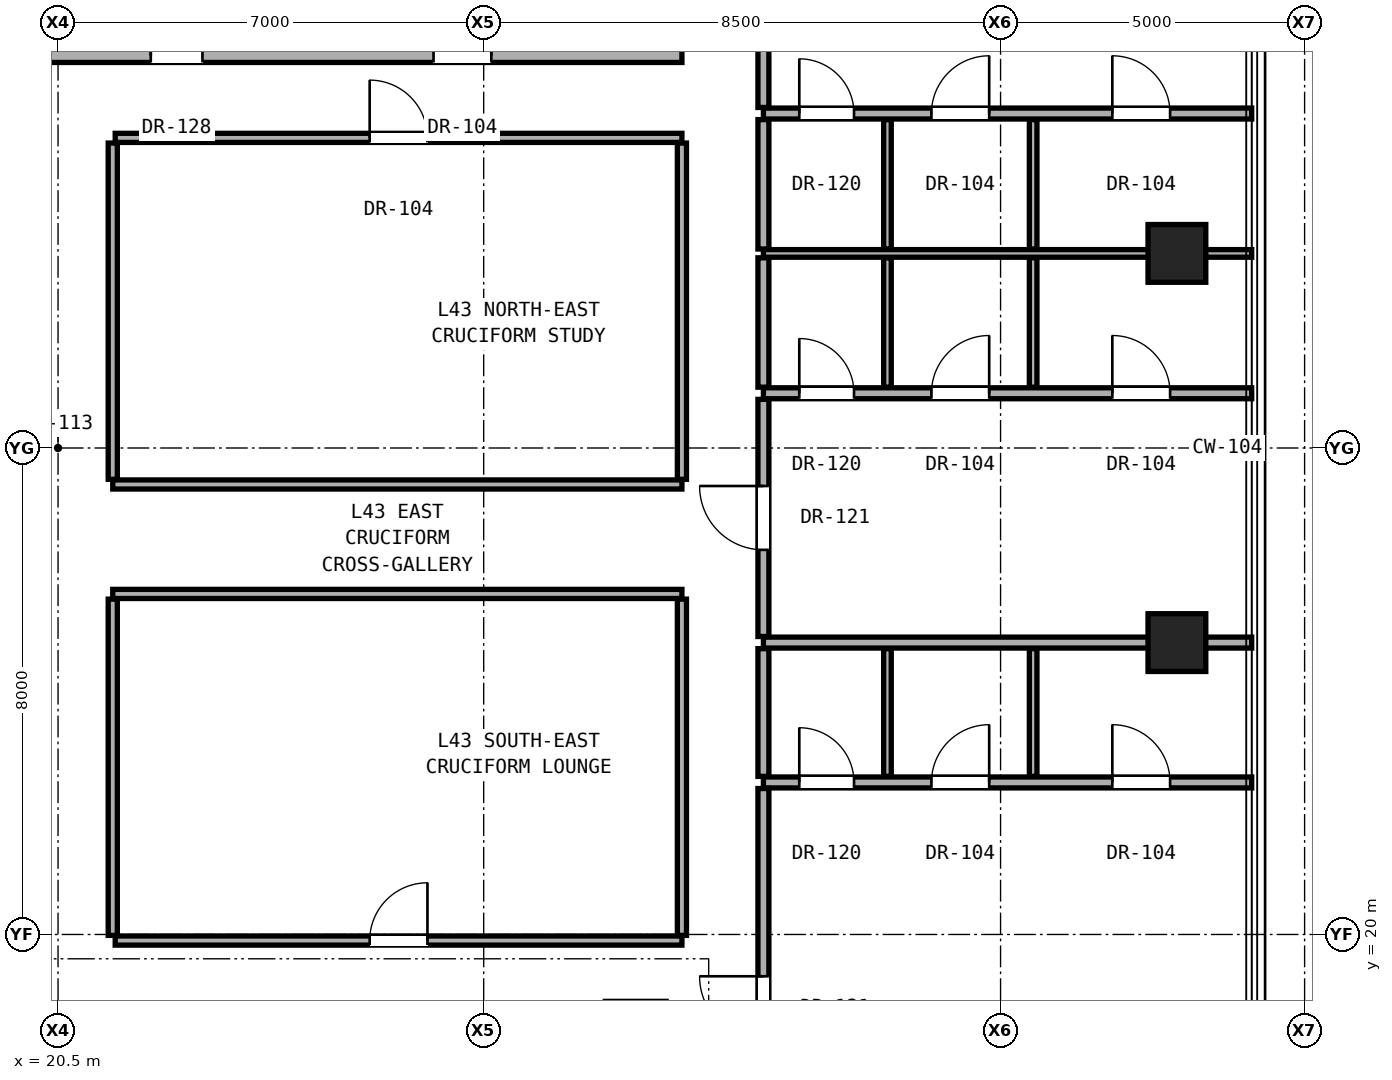
"""IFC4 building model, lengths in metres.
Left out: names, types, materials, properties, quantities, classifications, styles, units other than length and angle.
Written with IfcOpenShell. Run it as: python <this file> out.ifc"""

import sys

from ifc_helpers import new_model, si_unit, direction, frame, frame_2d, origin, origin_2d, place, context, subcontext, project, spatial, rectangle, hollow_rectangle, extrude, element, fill, save


model = new_model("IFC4")
c1 = context("Model", 3, precision=1e-05, world=origin(), true_north=direction((0.0, 1.0)))
c2 = subcontext(c1, "Body", "Model", "MODEL_VIEW")
j1 = project(units=[si_unit("LENGTHUNIT", "METRE"), si_unit("PLANEANGLEUNIT", "RADIAN")], contexts=[c1])
p1 = place(None, origin())
s1 = spatial("IfcSite", under=j1, at=p1, CompositionType="ELEMENT")
p2 = place(p1, origin())
s2 = spatial("IfcBuilding", under=s1, at=p2, CompositionType="ELEMENT")
p3 = place(p2, frame((0.0, 0.0, 154.4)))
s3 = spatial("IfcBuildingStorey", under=s2, at=p3, CompositionType="ELEMENT", Elevation=154.4)
for number, where, z_axis, x_axis in (
    (1, (38.9, 24.8, 0.0), (0.0, 0.0, 1.0), (1.0, 0.0, 0.0)),
    (2, (38.9, 31.2, 0.0), (0.0, 0.0, 1.0), (1.0, 0.0, 0.0)),
):
    element("IfcColumn", number, at=place(p3, frame(where, z_axis=z_axis, x_axis=x_axis)), inside=s3, PredefinedType="COLUMN", context=c2, shape_type="SweptSolid", body=[
        extrude(hollow_rectangle(XDim=0.95, YDim=0.95, WallThickness=0.05, at=origin_2d()), origin(), (0.0, 0.0, 1.0), 3.25),
    ])
p4 = place(p3, frame((21.44, 19.9, 0.0), z_axis=(0.0, 0.0, 1.0), x_axis=(1.0, 0.0, 0.0)))
e3 = element("IfcWall", 3, at=p4, inside=s3, PredefinedType="PARTITIONING", context=c2, shape_type="SweptSolid", body=[
    extrude(rectangle(XDim=9.32, YDim=0.15, at=frame_2d((4.66, 0.0))), origin(), (0.0, 0.0, 1.0), 2.186),
])
p5 = place(p4, frame((4.185, 0.0, 0.0)))
e4 = element("IfcOpeningElement", 4, at=p5, cuts=e3, PredefinedType="OPENING", context=c2, shape_type="SweptSolid", body=[
    extrude(rectangle(XDim=0.95, YDim=2.15, at=frame_2d((0.475, 1.075))), frame((0.0, 0.085, 0.0), z_axis=(0.0, -1.0, 0.0), x_axis=(1.0, 0.0, 0.0)), (0.0, 0.0, 1.0), 0.17),
])
p6 = place(p3, frame((32.1, 22.5, 0.0), z_axis=(0.0, 0.0, 1.0), x_axis=(1.0, 0.0, 0.0)))
e5 = element("IfcWall", 5, at=p6, inside=s3, PredefinedType="PARTITIONING", context=c2, shape_type="SweptSolid", body=[
    extrude(rectangle(XDim=8.03, YDim=0.18, at=frame_2d((4.015, 0.0))), origin(), (0.0, 0.0, 1.0), 2.269),
])
p7 = place(p6, frame((5.738, 0.0, 0.0)))
e6 = element("IfcOpeningElement", 6, at=p7, cuts=e5, PredefinedType="OPENING", context=c2, shape_type="SweptSolid", body=[
    extrude(rectangle(XDim=0.95, YDim=2.15, at=frame_2d((0.475, 1.075))), frame((0.0, 0.1, 0.0), z_axis=(0.0, -1.0, 0.0), x_axis=(1.0, 0.0, 0.0)), (0.0, 0.0, 1.0), 0.2),
])
p8 = place(p6, frame((2.763, 0.0, 0.0)))
e7 = element("IfcOpeningElement", 7, at=p8, cuts=e5, PredefinedType="OPENING", context=c2, shape_type="SweptSolid", body=[
    extrude(rectangle(XDim=0.95, YDim=2.15, at=frame_2d((0.475, 1.075))), frame((0.0, 0.1, 0.0), z_axis=(0.0, -1.0, 0.0), x_axis=(1.0, 0.0, 0.0)), (0.0, 0.0, 1.0), 0.2),
])
p9 = place(p6, frame((0.59, 0.0, 0.0)))
e8 = element("IfcOpeningElement", 8, at=p9, cuts=e5, PredefinedType="OPENING", context=c2, shape_type="SweptSolid", body=[
    extrude(rectangle(XDim=0.9, YDim=2.1, at=frame_2d((0.45, 1.05))), frame((0.0, 0.1, 0.0), z_axis=(0.0, -1.0, 0.0), x_axis=(1.0, 0.0, 0.0)), (0.0, 0.0, 1.0), 0.2),
])
p10 = place(p3, frame((32.1, 24.8, 0.0), z_axis=(0.0, 0.0, 1.0), x_axis=(1.0, 0.0, 0.0)))
e9 = element("IfcWall", 9, at=p10, inside=s3, PredefinedType="PARTITIONING", context=c2, shape_type="SweptSolid", body=[
    extrude(rectangle(XDim=8.03, YDim=0.18, at=frame_2d((4.015, 0.0))), origin(), (0.0, 0.0, 1.0), 2.269),
])
for number, where, z_axis, x_axis in (
    (10, (21.4, 25.6, 0.0), (0.0, 0.0, 1.0), (1.0, 0.0, 0.0)),
    (11, (21.4, 27.4, 0.0), (0.0, 0.0, 1.0), (1.0, 0.0, 0.0)),
):
    element("IfcWall", number, at=place(p3, frame(where, z_axis=z_axis, x_axis=x_axis)), inside=s3, PredefinedType="PARTITIONING", context=c2, shape_type="SweptSolid", body=[
        extrude(rectangle(XDim=9.36, YDim=0.15, at=frame_2d((4.68, 0.0))), origin(), (0.0, 0.0, 1.0), 2.186),
    ])
p11 = place(p3, frame((32.1, 28.9, 0.0), z_axis=(0.0, 0.0, 1.0), x_axis=(1.0, 0.0, 0.0)))
e12 = element("IfcWall", 12, at=p11, inside=s3, PredefinedType="PARTITIONING", context=c2, shape_type="SweptSolid", body=[
    extrude(rectangle(XDim=8.03, YDim=0.18, at=frame_2d((4.015, 0.0))), origin(), (0.0, 0.0, 1.0), 2.269),
])
p12 = place(p11, frame((5.738, 0.0, 0.0)))
e13 = element("IfcOpeningElement", 13, at=p12, cuts=e12, PredefinedType="OPENING", context=c2, shape_type="SweptSolid", body=[
    extrude(rectangle(XDim=0.95, YDim=2.15, at=frame_2d((0.475, 1.075))), frame((0.0, 0.1, 0.0), z_axis=(0.0, -1.0, 0.0), x_axis=(1.0, 0.0, 0.0)), (0.0, 0.0, 1.0), 0.2),
])
p13 = place(p11, frame((2.763, 0.0, 0.0)))
e14 = element("IfcOpeningElement", 14, at=p13, cuts=e12, PredefinedType="OPENING", context=c2, shape_type="SweptSolid", body=[
    extrude(rectangle(XDim=0.95, YDim=2.15, at=frame_2d((0.475, 1.075))), frame((0.0, 0.1, 0.0), z_axis=(0.0, -1.0, 0.0), x_axis=(1.0, 0.0, 0.0)), (0.0, 0.0, 1.0), 0.2),
])
p14 = place(p11, frame((0.59, 0.0, 0.0)))
e15 = element("IfcOpeningElement", 15, at=p14, cuts=e12, PredefinedType="OPENING", context=c2, shape_type="SweptSolid", body=[
    extrude(rectangle(XDim=0.9, YDim=2.1, at=frame_2d((0.45, 1.05))), frame((0.0, 0.1, 0.0), z_axis=(0.0, -1.0, 0.0), x_axis=(1.0, 0.0, 0.0)), (0.0, 0.0, 1.0), 0.2),
])
p15 = place(p3, frame((32.1, 31.2, 0.0), z_axis=(0.0, 0.0, 1.0), x_axis=(1.0, 0.0, 0.0)))
e16 = element("IfcWall", 16, at=p15, inside=s3, PredefinedType="PARTITIONING", context=c2, shape_type="SweptSolid", body=[
    extrude(rectangle(XDim=8.03, YDim=0.125, at=frame_2d((4.015, 0.0))), origin(), (0.0, 0.0, 1.0), 2.269),
])
p16 = place(p3, frame((21.44, 33.1, 0.0), z_axis=(0.0, 0.0, 1.0), x_axis=(1.0, 0.0, 0.0)))
e17 = element("IfcWall", 17, at=p16, inside=s3, PredefinedType="PARTITIONING", context=c2, shape_type="SweptSolid", body=[
    extrude(rectangle(XDim=9.32, YDim=0.15, at=frame_2d((4.66, 0.0))), origin(), (0.0, 0.0, 1.0), 2.186),
])
p17 = place(p16, frame((4.185, 0.0, 0.0)))
e18 = element("IfcOpeningElement", 18, at=p17, cuts=e17, PredefinedType="OPENING", context=c2, shape_type="SweptSolid", body=[
    extrude(rectangle(XDim=0.95, YDim=2.15, at=frame_2d((0.475, 1.075))), frame((0.0, 0.085, 0.0), z_axis=(0.0, -1.0, 0.0), x_axis=(1.0, 0.0, 0.0)), (0.0, 0.0, 1.0), 0.17),
])
p18 = place(p3, frame((32.1, 33.5, 0.0), z_axis=(0.0, 0.0, 1.0), x_axis=(1.0, 0.0, 0.0)))
e19 = element("IfcWall", 19, at=p18, inside=s3, PredefinedType="PARTITIONING", context=c2, shape_type="SweptSolid", body=[
    extrude(rectangle(XDim=8.03, YDim=0.18, at=frame_2d((4.015, 0.0))), origin(), (0.0, 0.0, 1.0), 2.269),
])
p19 = place(p18, frame((5.738, 0.0, 0.0)))
e20 = element("IfcOpeningElement", 20, at=p19, cuts=e19, PredefinedType="OPENING", context=c2, shape_type="SweptSolid", body=[
    extrude(rectangle(XDim=0.95, YDim=2.15, at=frame_2d((0.475, 1.075))), frame((0.0, 0.1, 0.0), z_axis=(0.0, -1.0, 0.0), x_axis=(1.0, 0.0, 0.0)), (0.0, 0.0, 1.0), 0.2),
])
p20 = place(p18, frame((2.763, 0.0, 0.0)))
e21 = element("IfcOpeningElement", 21, at=p20, cuts=e19, PredefinedType="OPENING", context=c2, shape_type="SweptSolid", body=[
    extrude(rectangle(XDim=0.95, YDim=2.15, at=frame_2d((0.475, 1.075))), frame((0.0, 0.1, 0.0), z_axis=(0.0, -1.0, 0.0), x_axis=(1.0, 0.0, 0.0)), (0.0, 0.0, 1.0), 0.2),
])
p21 = place(p18, frame((0.59, 0.0, 0.0)))
e22 = element("IfcOpeningElement", 22, at=p21, cuts=e19, PredefinedType="OPENING", context=c2, shape_type="SweptSolid", body=[
    extrude(rectangle(XDim=0.9, YDim=2.1, at=frame_2d((0.45, 1.05))), frame((0.0, 0.1, 0.0), z_axis=(0.0, -1.0, 0.0), x_axis=(1.0, 0.0, 0.0)), (0.0, 0.0, 1.0), 0.2),
])
p22 = place(p3, frame((15.59, 34.45, 0.0), z_axis=(0.0, 0.0, 1.0), x_axis=(1.0, 0.0, 0.0)))
e23 = element("IfcWall", 23, at=p22, inside=s3, PredefinedType="SOLIDWALL", context=c2, shape_type="SweptSolid", body=[
    extrude(rectangle(XDim=15.17, YDim=0.22, at=frame_2d((7.585, 0.0))), origin(), (0.0, 0.0, 1.0), 2.186),
])
p23 = place(p22, frame((6.435, 0.0, 0.0)))
e24 = element("IfcOpeningElement", 24, at=p23, cuts=e23, PredefinedType="OPENING", context=c2, shape_type="SweptSolid", body=[
    extrude(rectangle(XDim=0.85, YDim=2.01, at=frame_2d((0.425, 1.005))), frame((0.0, 0.12, 0.0), z_axis=(0.0, -1.0, 0.0), x_axis=(1.0, 0.0, 0.0)), (0.0, 0.0, 1.0), 0.24),
])
p24 = place(p22, frame((11.085, 0.0, 0.0)))
e25 = element("IfcOpeningElement", 25, at=p24, cuts=e23, PredefinedType="OPENING", context=c2, shape_type="SweptSolid", body=[
    extrude(rectangle(XDim=0.95, YDim=2.15, at=frame_2d((0.475, 1.075))), frame((0.0, 0.12, 0.0), z_axis=(0.0, -1.0, 0.0), x_axis=(1.0, 0.0, 0.0)), (0.0, 0.0, 1.0), 0.24),
])
p25 = place(p22, frame((1.775, 0.0, 0.0)))
e26 = element("IfcOpeningElement", 26, at=p25, cuts=e23, PredefinedType="OPENING", context=c2, shape_type="SweptSolid", body=[
    extrude(rectangle(XDim=0.85, YDim=2.01, at=frame_2d((0.425, 1.005))), frame((0.0, 0.12, 0.0), z_axis=(0.0, -1.0, 0.0), x_axis=(1.0, 0.0, 0.0)), (0.0, 0.0, 1.0), 0.24),
])
for number, where, z_axis, x_axis in (
    (27, (21.4, 19.985, 0.0), (0.0, 0.0, 1.0), (0.0, 1.0, 0.0)),
    (28, (21.4, 27.485, 0.0), (0.0, 0.0, 1.0), (0.0, 1.0, 0.0)),
):
    element("IfcWall", number, at=place(p3, frame(where, z_axis=z_axis, x_axis=x_axis)), inside=s3, PredefinedType="PARTITIONING", context=c2, shape_type="SweptSolid", body=[
        extrude(rectangle(XDim=5.53, YDim=0.15, at=frame_2d((2.765, 0.0))), origin(), (0.0, 0.0, 1.0), 2.186),
    ])
for number, where, z_axis, x_axis in (
    (29, (30.76, 19.985, 0.0), (0.0, 0.0, 1.0), (0.0, 1.0, 0.0)),
    (30, (30.76, 27.485, 0.0), (0.0, 0.0, 1.0), (0.0, 1.0, 0.0)),
):
    element("IfcWall", number, at=place(p3, frame(where, z_axis=z_axis, x_axis=x_axis)), inside=s3, PredefinedType="PARTITIONING", context=c2, shape_type="SweptSolid", body=[
        extrude(rectangle(XDim=5.53, YDim=0.15, at=frame_2d((2.765, 0.0))), origin(), (0.0, 0.0, 1.0), 2.346),
    ])
p26 = place(p3, frame((32.1, 15.175, 0.0), z_axis=(0.0, 0.0, 1.0), x_axis=(0.0, 1.0, 0.0)))
e31 = element("IfcWall", 31, at=p26, inside=s3, PredefinedType="PARTITIONING", context=c2, shape_type="SweptSolid", body=[
    extrude(rectangle(XDim=7.225, YDim=0.18, at=frame_2d((3.612, 0.0))), origin(), (0.0, 0.0, 1.0), 2.442),
])
p27 = place(p26, frame((3.087, 0.0, 0.0)))
e32 = element("IfcOpeningElement", 32, at=p27, cuts=e31, PredefinedType="OPENING", context=c2, shape_type="SweptSolid", body=[
    extrude(rectangle(XDim=1.05, YDim=2.2, at=frame_2d((0.525, 1.1))), frame((0.0, 0.1, 0.0), z_axis=(0.0, -1.0, 0.0), x_axis=(1.0, 0.0, 0.0)), (0.0, 0.0, 1.0), 0.2),
])
p28 = place(p3, frame((32.1, 22.6, 0.0), z_axis=(0.0, 0.0, 1.0), x_axis=(0.0, 1.0, 0.0)))
e33 = element("IfcWall", 33, at=p28, inside=s3, PredefinedType="PARTITIONING", context=c2, shape_type="SweptSolid", body=[
    extrude(rectangle(XDim=2.1, YDim=0.18, at=frame_2d((1.05, 0.0))), origin(), (0.0, 0.0, 1.0), 2.346),
])
p29 = place(p3, frame((32.1, 24.9, 0.0), z_axis=(0.0, 0.0, 1.0), x_axis=(0.0, 1.0, 0.0)))
e34 = element("IfcWall", 34, at=p29, inside=s3, PredefinedType="PARTITIONING", context=c2, shape_type="SweptSolid", body=[
    extrude(rectangle(XDim=3.9, YDim=0.18, at=frame_2d((1.95, 0.0))), origin(), (0.0, 0.0, 1.0), 2.346),
])
p30 = place(p29, frame((1.425, 0.0, 0.0)))
e35 = element("IfcOpeningElement", 35, at=p30, cuts=e34, PredefinedType="OPENING", context=c2, shape_type="SweptSolid", body=[
    extrude(rectangle(XDim=1.05, YDim=2.2, at=frame_2d((0.525, 1.1))), frame((0.0, 0.1, 0.0), z_axis=(0.0, -1.0, 0.0), x_axis=(1.0, 0.0, 0.0)), (0.0, 0.0, 1.0), 0.2),
])
for number, where, z_axis, x_axis in (
    (36, (32.1, 29.0, 0.0), (0.0, 0.0, 1.0), (0.0, 1.0, 0.0)),
    (37, (32.1, 31.272, 0.0), (0.0, 0.0, 1.0), (0.0, 1.0, 0.0)),
):
    element("IfcWall", number, at=place(p3, frame(where, z_axis=z_axis, x_axis=x_axis)), inside=s3, PredefinedType="PARTITIONING", context=c2, shape_type="SweptSolid", body=[
        extrude(rectangle(XDim=2.127, YDim=0.18, at=frame_2d((1.064, 0.0))), origin(), (0.0, 0.0, 1.0), 2.346),
    ])
p31 = place(p3, frame((32.1, 33.6, 0.0), z_axis=(0.0, 0.0, 1.0), x_axis=(0.0, 1.0, 0.0)))
e38 = element("IfcWall", 38, at=p31, inside=s3, PredefinedType="PARTITIONING", context=c2, shape_type="SweptSolid", body=[
    extrude(rectangle(XDim=7.225, YDim=0.18, at=frame_2d((3.612, 0.0))), origin(), (0.0, 0.0, 1.0), 2.442),
])
p32 = place(p31, frame((3.087, 0.0, 0.0)))
e39 = element("IfcOpeningElement", 39, at=p32, cuts=e38, PredefinedType="OPENING", context=c2, shape_type="SweptSolid", body=[
    extrude(rectangle(XDim=1.05, YDim=2.2, at=frame_2d((0.525, 1.1))), frame((0.0, 0.1, 0.0), z_axis=(0.0, -1.0, 0.0), x_axis=(1.0, 0.0, 0.0)), (0.0, 0.0, 1.0), 0.2),
])
p33 = place(p3, frame((34.14, 22.6, 0.0), z_axis=(0.0, 0.0, 1.0), x_axis=(0.0, 1.0, 0.0)))
e40 = element("IfcWall", 40, at=p33, inside=s3, PredefinedType="PARTITIONING", context=c2, shape_type="SweptSolid", body=[
    extrude(rectangle(XDim=2.1, YDim=0.125, at=frame_2d((1.05, 0.0))), origin(), (0.0, 0.0, 1.0), 2.346),
])
for number, where, z_axis, x_axis in (
    (41, (34.14, 29.0, 0.0), (0.0, 0.0, 1.0), (0.0, 1.0, 0.0)),
    (42, (34.14, 31.272, 0.0), (0.0, 0.0, 1.0), (0.0, 1.0, 0.0)),
):
    element("IfcWall", number, at=place(p3, frame(where, z_axis=z_axis, x_axis=x_axis)), inside=s3, PredefinedType="PARTITIONING", context=c2, shape_type="SweptSolid", body=[
        extrude(rectangle(XDim=2.127, YDim=0.125, at=frame_2d((1.064, 0.0))), origin(), (0.0, 0.0, 1.0), 2.346),
    ])
p34 = place(p3, frame((36.536, 22.6, 0.0), z_axis=(0.0, 0.0, 1.0), x_axis=(0.0, 1.0, 0.0)))
e43 = element("IfcWall", 43, at=p34, inside=s3, PredefinedType="PARTITIONING", context=c2, shape_type="SweptSolid", body=[
    extrude(rectangle(XDim=2.1, YDim=0.125, at=frame_2d((1.05, 0.0))), origin(), (0.0, 0.0, 1.0), 2.346),
])
for number, where, z_axis, x_axis in (
    (44, (36.536, 29.0, 0.0), (0.0, 0.0, 1.0), (0.0, 1.0, 0.0)),
    (45, (36.536, 31.272, 0.0), (0.0, 0.0, 1.0), (0.0, 1.0, 0.0)),
):
    element("IfcWall", number, at=place(p3, frame(where, z_axis=z_axis, x_axis=x_axis)), inside=s3, PredefinedType="PARTITIONING", context=c2, shape_type="SweptSolid", body=[
        extrude(rectangle(XDim=2.127, YDim=0.125, at=frame_2d((1.064, 0.0))), origin(), (0.0, 0.0, 1.0), 2.346),
    ])
p35 = place(p23, origin())
e46 = element("IfcDoor", 46, at=p35, inside=s3, OperationType="SINGLE_SWING_LEFT", PredefinedType="DOOR", context=c2, shape_type="SweptSolid", body=[
    extrude(rectangle(XDim=0.85, YDim=2.01, at=frame_2d((0.425, 1.005))), frame((0.0, 0.025, 0.0), z_axis=(0.0, -1.0, 0.0), x_axis=(1.0, 0.0, 0.0)), (0.0, 0.0, 1.0), 0.05),
])
fill(e24, e46)
p36 = place(p24, origin())
e47 = element("IfcDoor", 47, at=p36, inside=s3, OperationType="SINGLE_SWING_RIGHT", PredefinedType="DOOR", context=c2, shape_type="SweptSolid", body=[
    extrude(rectangle(XDim=0.95, YDim=2.15, at=frame_2d((0.475, 1.075))), frame((0.0, 0.025, 0.0), z_axis=(0.0, -1.0, 0.0), x_axis=(1.0, 0.0, 0.0)), (0.0, 0.0, 1.0), 0.05),
])
fill(e25, e47)
p37 = place(p27, origin())
e48 = element("IfcDoor", 48, at=p37, inside=s3, OperationType="SINGLE_SWING_RIGHT", PredefinedType="DOOR", context=c2, shape_type="SweptSolid", body=[
    extrude(rectangle(XDim=1.05, YDim=2.2, at=frame_2d((0.525, 1.1))), frame((0.0, 0.025, 0.0), z_axis=(0.0, -1.0, 0.0), x_axis=(1.0, 0.0, 0.0)), (0.0, 0.0, 1.0), 0.05),
])
fill(e32, e48)
p38 = place(p7, origin())
e49 = element("IfcDoor", 49, at=p38, inside=s3, OperationType="SINGLE_SWING_LEFT", PredefinedType="DOOR", context=c2, shape_type="SweptSolid", body=[
    extrude(rectangle(XDim=0.95, YDim=2.15, at=frame_2d((0.475, 1.075))), frame((0.0, 0.025, 0.0), z_axis=(0.0, -1.0, 0.0), x_axis=(1.0, 0.0, 0.0)), (0.0, 0.0, 1.0), 0.05),
])
fill(e6, e49)
p39 = place(p8, origin())
e50 = element("IfcDoor", 50, at=p39, inside=s3, OperationType="SINGLE_SWING_RIGHT", PredefinedType="DOOR", context=c2, shape_type="SweptSolid", body=[
    extrude(rectangle(XDim=0.95, YDim=2.15, at=frame_2d((0.475, 1.075))), frame((0.0, 0.025, 0.0), z_axis=(0.0, -1.0, 0.0), x_axis=(1.0, 0.0, 0.0)), (0.0, 0.0, 1.0), 0.05),
])
fill(e7, e50)
p40 = place(p9, origin())
e51 = element("IfcDoor", 51, at=p40, inside=s3, OperationType="SINGLE_SWING_LEFT", PredefinedType="DOOR", context=c2, shape_type="SweptSolid", body=[
    extrude(rectangle(XDim=0.9, YDim=2.1, at=frame_2d((0.45, 1.05))), frame((0.0, 0.025, 0.0), z_axis=(0.0, -1.0, 0.0), x_axis=(1.0, 0.0, 0.0)), (0.0, 0.0, 1.0), 0.05),
])
fill(e8, e51)
p41 = place(p30, origin())
e52 = element("IfcDoor", 52, at=p41, inside=s3, OperationType="SINGLE_SWING_RIGHT", PredefinedType="DOOR", context=c2, shape_type="SweptSolid", body=[
    extrude(rectangle(XDim=1.05, YDim=2.2, at=frame_2d((0.525, 1.1))), frame((0.0, 0.025, 0.0), z_axis=(0.0, -1.0, 0.0), x_axis=(1.0, 0.0, 0.0)), (0.0, 0.0, 1.0), 0.05),
])
fill(e35, e52)
p42 = place(p12, origin())
e53 = element("IfcDoor", 53, at=p42, inside=s3, OperationType="SINGLE_SWING_LEFT", PredefinedType="DOOR", context=c2, shape_type="SweptSolid", body=[
    extrude(rectangle(XDim=0.95, YDim=2.15, at=frame_2d((0.475, 1.075))), frame((0.0, 0.025, 0.0), z_axis=(0.0, -1.0, 0.0), x_axis=(1.0, 0.0, 0.0)), (0.0, 0.0, 1.0), 0.05),
])
fill(e13, e53)
p43 = place(p13, origin())
e54 = element("IfcDoor", 54, at=p43, inside=s3, OperationType="SINGLE_SWING_RIGHT", PredefinedType="DOOR", context=c2, shape_type="SweptSolid", body=[
    extrude(rectangle(XDim=0.95, YDim=2.15, at=frame_2d((0.475, 1.075))), frame((0.0, 0.025, 0.0), z_axis=(0.0, -1.0, 0.0), x_axis=(1.0, 0.0, 0.0)), (0.0, 0.0, 1.0), 0.05),
])
fill(e14, e54)
p44 = place(p14, origin())
e55 = element("IfcDoor", 55, at=p44, inside=s3, OperationType="SINGLE_SWING_LEFT", PredefinedType="DOOR", context=c2, shape_type="SweptSolid", body=[
    extrude(rectangle(XDim=0.9, YDim=2.1, at=frame_2d((0.45, 1.05))), frame((0.0, 0.025, 0.0), z_axis=(0.0, -1.0, 0.0), x_axis=(1.0, 0.0, 0.0)), (0.0, 0.0, 1.0), 0.05),
])
fill(e15, e55)
p45 = place(p19, origin())
e56 = element("IfcDoor", 56, at=p45, inside=s3, OperationType="SINGLE_SWING_LEFT", PredefinedType="DOOR", context=c2, shape_type="SweptSolid", body=[
    extrude(rectangle(XDim=0.95, YDim=2.15, at=frame_2d((0.475, 1.075))), frame((0.0, 0.025, 0.0), z_axis=(0.0, -1.0, 0.0), x_axis=(1.0, 0.0, 0.0)), (0.0, 0.0, 1.0), 0.05),
])
fill(e20, e56)
p46 = place(p20, origin())
e57 = element("IfcDoor", 57, at=p46, inside=s3, OperationType="SINGLE_SWING_RIGHT", PredefinedType="DOOR", context=c2, shape_type="SweptSolid", body=[
    extrude(rectangle(XDim=0.95, YDim=2.15, at=frame_2d((0.475, 1.075))), frame((0.0, 0.025, 0.0), z_axis=(0.0, -1.0, 0.0), x_axis=(1.0, 0.0, 0.0)), (0.0, 0.0, 1.0), 0.05),
])
fill(e21, e57)
p47 = place(p21, origin())
e58 = element("IfcDoor", 58, at=p47, inside=s3, OperationType="SINGLE_SWING_LEFT", PredefinedType="DOOR", context=c2, shape_type="SweptSolid", body=[
    extrude(rectangle(XDim=0.9, YDim=2.1, at=frame_2d((0.45, 1.05))), frame((0.0, 0.025, 0.0), z_axis=(0.0, -1.0, 0.0), x_axis=(1.0, 0.0, 0.0)), (0.0, 0.0, 1.0), 0.05),
])
fill(e22, e58)
p48 = place(p5, origin())
e59 = element("IfcDoor", 59, at=p48, inside=s3, OperationType="SINGLE_SWING_RIGHT", PredefinedType="DOOR", context=c2, shape_type="SweptSolid", body=[
    extrude(rectangle(XDim=0.95, YDim=2.15, at=frame_2d((0.475, 1.075))), frame((0.0, 0.025, 0.0), z_axis=(0.0, -1.0, 0.0), x_axis=(1.0, 0.0, 0.0)), (0.0, 0.0, 1.0), 0.05),
])
fill(e4, e59)
p49 = place(p17, origin())
e60 = element("IfcDoor", 60, at=p49, inside=s3, OperationType="SINGLE_SWING_LEFT", PredefinedType="DOOR", context=c2, shape_type="SweptSolid", body=[
    extrude(rectangle(XDim=0.95, YDim=2.15, at=frame_2d((0.475, 1.075))), frame((0.0, 0.025, 0.0), z_axis=(0.0, -1.0, 0.0), x_axis=(1.0, 0.0, 0.0)), (0.0, 0.0, 1.0), 0.05),
])
fill(e18, e60)
save(model, sys.argv[1])
